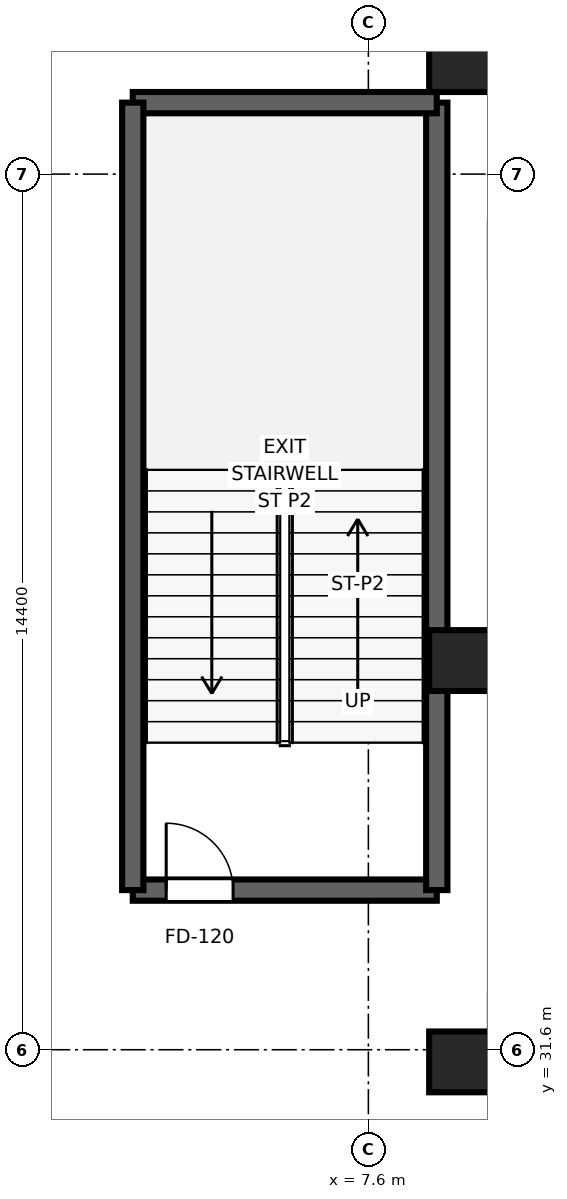
"""IFC4 building model, lengths in metres.
Left out: names, types, materials, properties, quantities, classifications, styles, units other than length and angle.
Written with IfcOpenShell. Run it as: python <this file> out.ifc"""

import sys

from ifc_helpers import new_model, si_unit, direction, frame, frame_2d, origin, origin_2d, place, context, subcontext, project, spatial, rectangle, extrude, source, transform, mapped, element, fill, save


model = new_model("IFC4")
c1 = context("Model", 3, precision=1e-05, world=origin(), true_north=direction((0.0, 1.0)))
c2 = subcontext(c1, "Body", "Model", "MODEL_VIEW")
j1 = project(units=[si_unit("LENGTHUNIT", "METRE"), si_unit("PLANEANGLEUNIT", "RADIAN")], contexts=[c1])
p1 = place(None, origin())
s1 = spatial("IfcSite", under=j1, at=p1, CompositionType="ELEMENT")
p2 = place(p1, origin())
s2 = spatial("IfcBuilding", under=s1, at=p2, CompositionType="ELEMENT")
p3 = place(p2, frame((0.0, 0.0, 11.0)))
s3 = spatial("IfcBuildingStorey", under=s2, at=p3, CompositionType="ELEMENT", Elevation=11.0)
p4 = place(p3, frame((3.725, 34.225, 0.0), z_axis=(0.0, 0.0, 1.0), x_axis=(1.0, 0.0, 0.0)))
e1 = element("IfcWall", 1, at=p4, inside=s3, PredefinedType="SHEAR", context=c2, shape_type="SweptSolid", body=[
    extrude(rectangle(XDim=5.0, YDim=0.35, at=frame_2d((2.5, 0.0))), origin(), (0.0, 0.0, 1.0), 5.0),
])
p5 = place(p4, frame((0.55, 0.0, 0.0)))
e2 = element("IfcOpeningElement", 2, at=p5, cuts=e1, PredefinedType="OPENING", context=c2, shape_type="SweptSolid", body=[
    extrude(rectangle(XDim=1.1, YDim=2.12, at=frame_2d((0.55, 1.06))), frame((0.0, 0.185, 0.0), z_axis=(0.0, -1.0, 0.0), x_axis=(1.0, 0.0, 0.0)), (0.0, 0.0, 1.0), 0.37),
])
p6 = place(p3, frame((8.725, 34.225, 0.0), z_axis=(0.0, 0.0, 1.0), x_axis=(0.0, 1.0, 0.0)))
e3 = element("IfcWall", 3, at=p6, inside=s3, PredefinedType="SHEAR", context=c2, shape_type="SweptSolid", body=[
    extrude(rectangle(XDim=12.95, YDim=0.35, at=frame_2d((6.475, 0.0))), origin(), (0.0, 0.0, 1.0), 5.0),
])
p7 = place(p3, frame((8.725, 47.175, 0.0), z_axis=(0.0, 0.0, 1.0), x_axis=(-1.0, 0.0, 0.0)))
e4 = element("IfcWall", 4, at=p7, inside=s3, PredefinedType="SHEAR", context=c2, shape_type="SweptSolid", body=[
    extrude(rectangle(XDim=5.0, YDim=0.35, at=frame_2d((2.5, 0.0))), origin(), (0.0, 0.0, 1.0), 5.0),
])
p8 = place(p3, frame((3.725, 47.175, 0.0), z_axis=(0.0, 0.0, 1.0), x_axis=(0.0, -1.0, 0.0)))
e5 = element("IfcWall", 5, at=p8, inside=s3, PredefinedType="SHEAR", context=c2, shape_type="SweptSolid", body=[
    extrude(rectangle(XDim=12.95, YDim=0.35, at=frame_2d((6.475, 0.0))), origin(), (0.0, 0.0, 1.0), 5.0),
])
m1 = source(origin(), c2, "Body", "SweptSolid", [
    extrude(rectangle(XDim=1.0, YDim=1.0, at=origin_2d()), origin(), (0.0, 0.0, 1.0), 5.0),
])
for number, where, z_axis, x_axis in (
    (6, (9.1, 47.85, 0.0), (0.0, 0.0, 1.0), (1.0, 0.0, 0.0)),
    (7, (9.1, 38.0, 0.0), (0.0, 0.0, 1.0), (1.0, 0.0, 0.0)),
    (8, (9.1, 31.4, 0.0), (0.0, 0.0, 1.0), (1.0, 0.0, 0.0)),
):
    element("IfcColumn", number, at=place(p3, frame(where, z_axis=z_axis, x_axis=x_axis)), inside=s3, PredefinedType="COLUMN", context=c2, shape_type="MappedRepresentation", body=[
        mapped(m1, transform((0.0, 0.0, 0.0), x_axis=(1.0, 0.0, 0.0), y_axis=(0.0, 1.0, 0.0), z_axis=(0.0, 0.0, 1.0), scale=1.0)),
    ])
m2 = source(origin(), c2, "Body", "SweptSolid", [
    extrude(rectangle(XDim=1.1, YDim=2.12, at=frame_2d((0.55, 1.06))), frame((0.0, 0.025, 0.0), z_axis=(0.0, -1.0, 0.0), x_axis=(1.0, 0.0, 0.0)), (0.0, 0.0, 1.0), 0.05),
])
p9 = place(p5, origin())
e9 = element("IfcDoor", 9, at=p9, inside=s3, OperationType="SINGLE_SWING_LEFT", PredefinedType="DOOR", context=c2, shape_type="MappedRepresentation", body=[
    mapped(m2, transform((0.0, 0.0, 0.0), x_axis=(1.0, 0.0, 0.0), y_axis=(0.0, 1.0, 0.0), z_axis=(0.0, 0.0, 1.0), scale=1.0)),
])
fill(e2, e9)
save(model, sys.argv[1])
